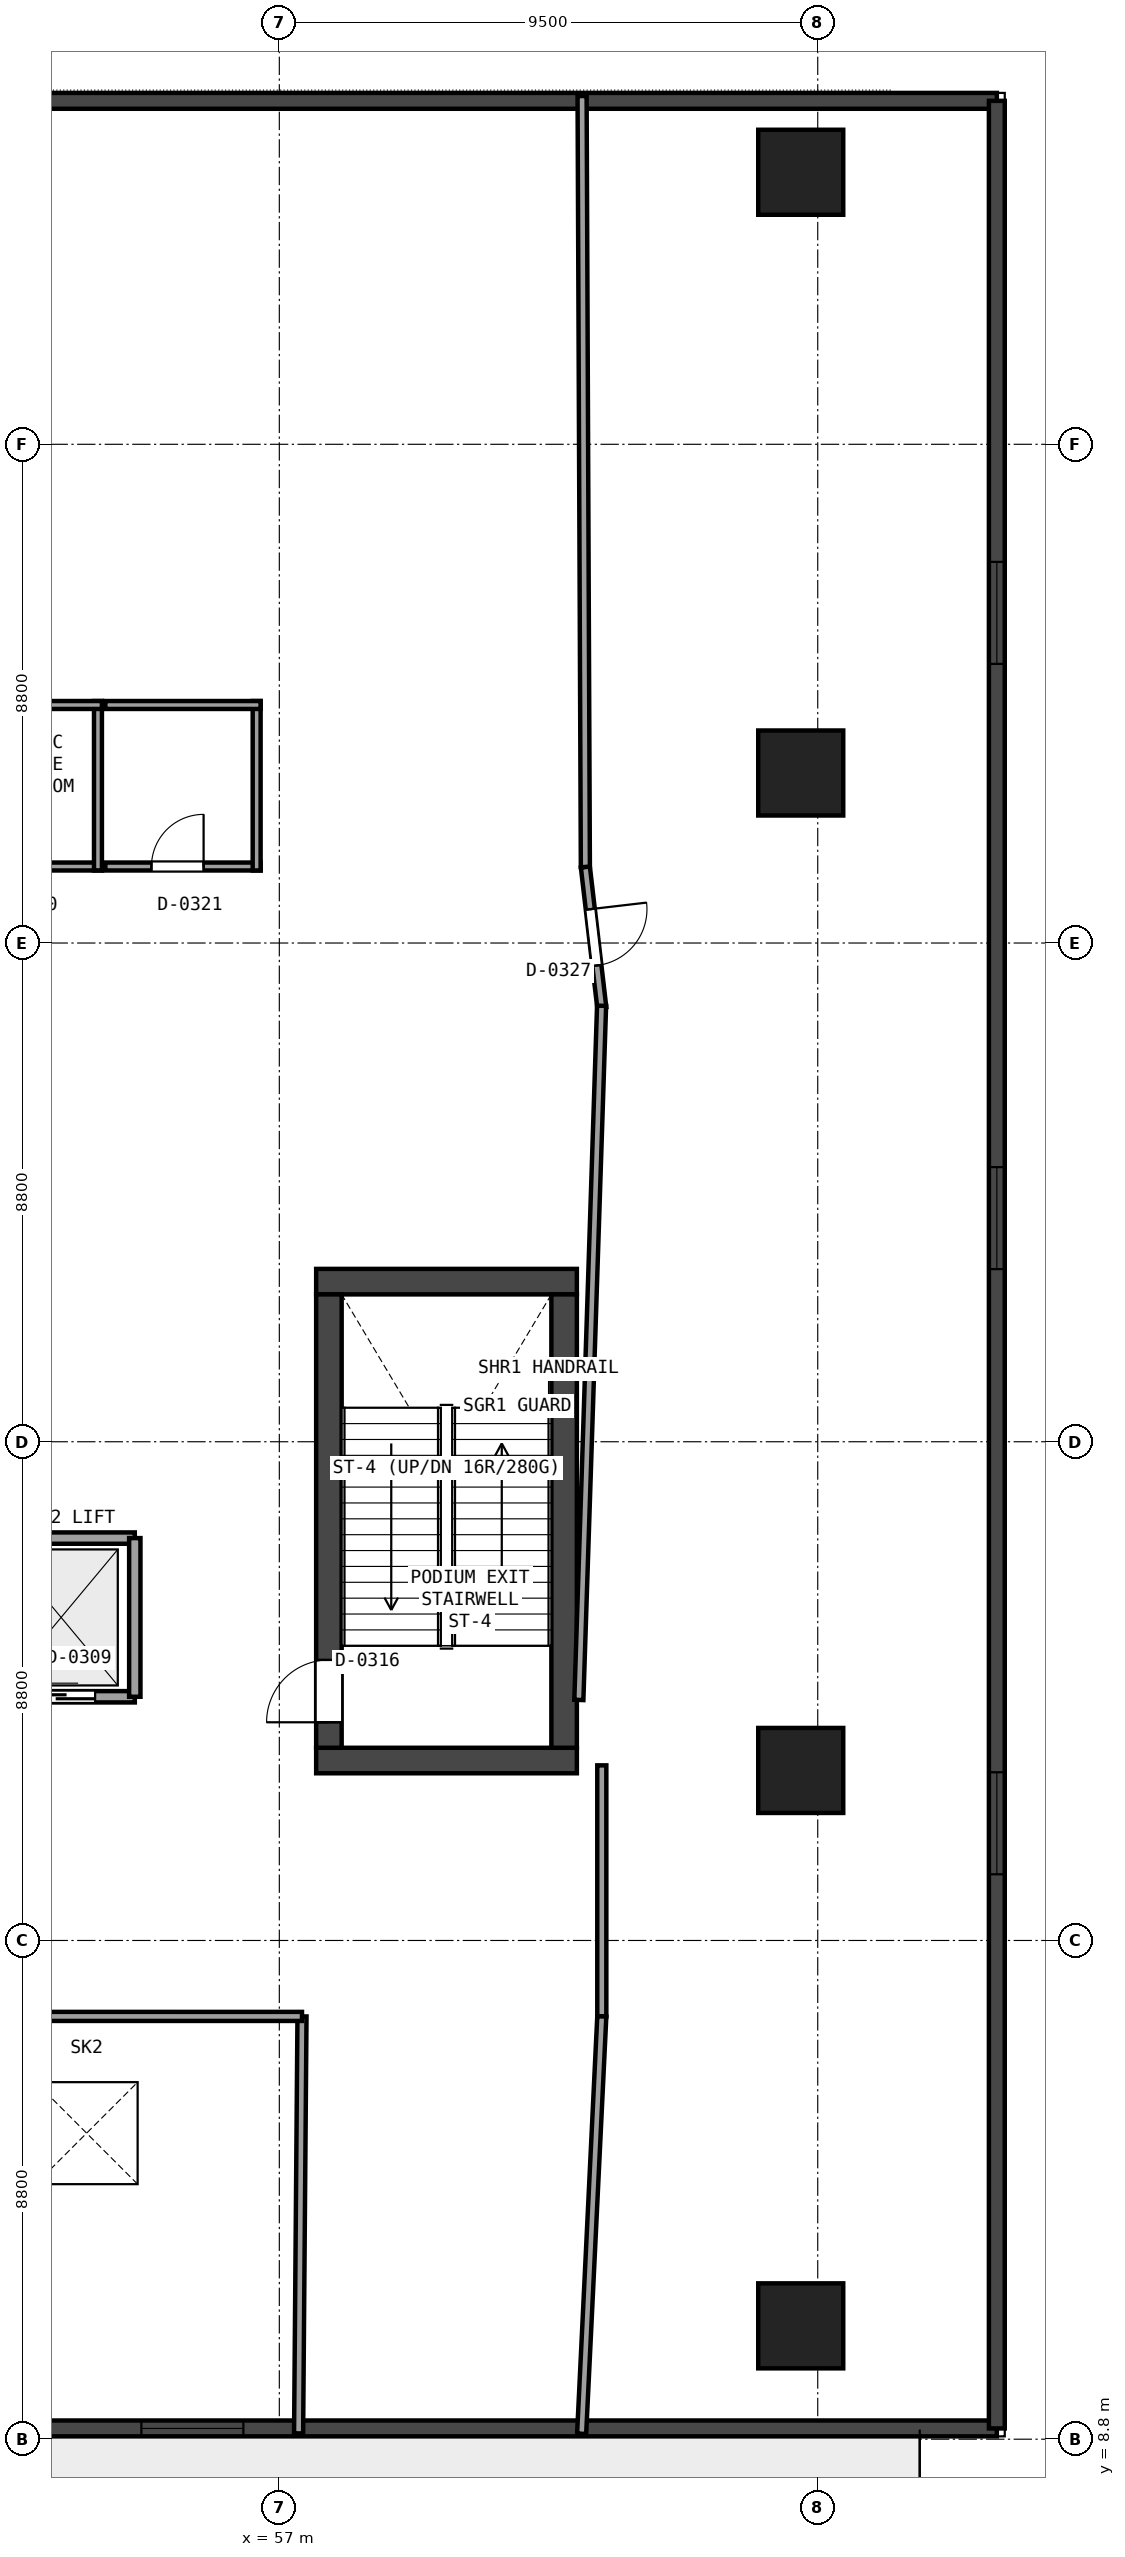
"""IFC4 building model, lengths in metres.
Left out: names, types, materials, properties, quantities, classifications, styles, units other than length and angle.
Written with IfcOpenShell. Run it as: python <this file> out.ifc"""

import sys

from ifc_helpers import new_model, si_unit, direction, frame, frame_2d, origin, origin_2d, place, context, subcontext, project, spatial, rectangle, extrude, element, fill, save


model = new_model("IFC4")
c1 = context("Model", 3, precision=1e-05, world=origin(), true_north=direction((0.0, 1.0)))
c2 = subcontext(c1, "Body", "Model", "MODEL_VIEW")
j1 = project(units=[si_unit("LENGTHUNIT", "METRE"), si_unit("PLANEANGLEUNIT", "RADIAN")], contexts=[c1])
p1 = place(None, origin())
s1 = spatial("IfcSite", under=j1, at=p1, CompositionType="ELEMENT")
p2 = place(p1, origin())
s2 = spatial("IfcBuilding", under=s1, at=p2, CompositionType="ELEMENT")
p3 = place(p2, frame((0.0, 0.0, 16.2)))
s3 = spatial("IfcBuildingStorey", under=s2, at=p3, CompositionType="ELEMENT", Elevation=16.2)
for number, where, z_axis, x_axis in (
    (1, (57.65, 20.775, 0.0), (0.0, 0.0, 1.0), (1.0, 0.0, 0.0)),
    (2, (57.65, 29.225, 0.0), (0.0, 0.0, 1.0), (1.0, 0.0, 0.0)),
):
    element("IfcWall", number, at=place(p3, frame(where, z_axis=z_axis, x_axis=x_axis)), inside=s3, PredefinedType="SHEAR", context=c2, shape_type="SweptSolid", body=[
        extrude(rectangle(XDim=4.6, YDim=0.45, at=frame_2d((2.3, 0.0))), origin(), (0.0, 0.0, 1.0), 4.98),
    ])
p4 = place(p3, frame((57.875, 21.0, 0.0), z_axis=(0.0, 0.0, 1.0), x_axis=(0.0, 1.0, 0.0)))
e3 = element("IfcWall", 3, at=p4, inside=s3, PredefinedType="SHEAR", context=c2, shape_type="SweptSolid", body=[
    extrude(rectangle(XDim=8.0, YDim=0.45, at=frame_2d((4.0, 0.0))), origin(), (0.0, 0.0, 1.0), 4.98),
])
p5 = place(p4, frame((0.45, 0.0, 0.0)))
e4 = element("IfcOpeningElement", 4, at=p5, cuts=e3, PredefinedType="OPENING", context=c2, shape_type="SweptSolid", body=[
    extrude(rectangle(XDim=1.1, YDim=2.15, at=frame_2d((0.55, 1.075))), frame((0.0, 0.235, 0.0), z_axis=(0.0, -1.0, 0.0), x_axis=(1.0, 0.0, 0.0)), (0.0, 0.0, 1.0), 0.47),
])
p6 = place(p3, frame((62.025, 21.0, 0.0), z_axis=(0.0, 0.0, 1.0), x_axis=(0.0, 1.0, 0.0)))
e5 = element("IfcWall", 5, at=p6, inside=s3, PredefinedType="SHEAR", context=c2, shape_type="SweptSolid", body=[
    extrude(rectangle(XDim=8.0, YDim=0.45, at=frame_2d((4.0, 0.0))), origin(), (0.0, 0.0, 1.0), 4.98),
])
for number, where, z_axis, x_axis in (
    (6, (66.2, 10.8, 0.0), (0.0, 0.0, 1.0), (1.0, 0.0, 0.0)),
    (7, (66.2, 20.6, 0.0), (0.0, 0.0, 1.0), (1.0, 0.0, 0.0)),
    (8, (66.2, 38.2, 0.0), (0.0, 0.0, 1.0), (1.0, 0.0, 0.0)),
    (9, (66.2, 48.8, 0.0), (0.0, 0.0, 1.0), (1.0, 0.0, 0.0)),
):
    element("IfcColumn", number, at=place(p3, frame(where, z_axis=z_axis, x_axis=x_axis)), inside=s3, PredefinedType="COLUMN", context=c2, shape_type="SweptSolid", body=[
        extrude(rectangle(XDim=1.5, YDim=1.5, at=origin_2d()), origin(), (0.0, 0.0, 1.0), 4.98),
    ])
p7 = place(p3, frame((69.66, 8.99, 0.0), z_axis=(0.0, 0.0, 1.0), x_axis=(-1.0, 0.0, 0.0)))
e10 = element("IfcWall", 10, at=p7, inside=s3, PredefinedType="SOLIDWALL", context=c2, shape_type="SweptSolid", body=[
    extrude(rectangle(XDim=64.52, YDim=0.28, at=frame_2d((32.26, 0.0))), origin(), (0.0, 0.0, 1.0), 4.98),
])
p8 = place(p7, frame((13.294, 0.0, 0.95)))
e11 = element("IfcOpeningElement", 11, at=p8, cuts=e10, PredefinedType="OPENING", context=c2, shape_type="SweptSolid", body=[
    extrude(rectangle(XDim=1.8, YDim=2.3, at=frame_2d((0.9, 1.15))), frame((0.0, 0.15, 0.0), z_axis=(0.0, -1.0, 0.0), x_axis=(1.0, 0.0, 0.0)), (0.0, 0.0, 1.0), 0.3),
])
p9 = place(p7, frame((34.06, 0.0, 0.0)))
e12 = element("IfcOpeningElement", 12, at=p9, cuts=e10, PredefinedType="OPENING", context=c2, shape_type="SweptSolid", body=[
    extrude(rectangle(XDim=1.2, YDim=2.2, at=frame_2d((0.6, 1.1))), frame((0.0, 0.15, 0.0), z_axis=(0.0, -1.0, 0.0), x_axis=(1.0, 0.0, 0.0)), (0.0, 0.0, 1.0), 0.3),
])
p10 = place(p3, frame((5.14, 50.06, 0.0), z_axis=(0.0, 0.0, 1.0), x_axis=(1.0, 0.0, 0.0)))
e13 = element("IfcWall", 13, at=p10, inside=s3, PredefinedType="SOLIDWALL", context=c2, shape_type="SweptSolid", body=[
    extrude(rectangle(XDim=64.52, YDim=0.28, at=frame_2d((32.26, 0.0))), origin(), (0.0, 0.0, 1.0), 4.98),
])
p11 = place(p10, frame((30.07, 0.0, 0.95)))
e14 = element("IfcOpeningElement", 14, at=p11, cuts=e13, PredefinedType="OPENING", context=c2, shape_type="SweptSolid", body=[
    extrude(rectangle(XDim=1.8, YDim=2.3, at=frame_2d((0.9, 1.15))), frame((0.0, 0.15, 0.0), z_axis=(0.0, -1.0, 0.0), x_axis=(1.0, 0.0, 0.0)), (0.0, 0.0, 1.0), 0.3),
])
p12 = place(p3, frame((69.66, 50.06, 0.0), z_axis=(0.0, 0.0, 1.0), x_axis=(0.0, -1.0, 0.0)))
e15 = element("IfcWall", 15, at=p12, inside=s3, PredefinedType="SOLIDWALL", context=c2, shape_type="SweptSolid", body=[
    extrude(rectangle(XDim=41.07, YDim=0.28, at=frame_2d((20.535, 0.0))), origin(), (0.0, 0.0, 1.0), 4.98),
])
p13 = place(p12, frame((8.135, 0.0, 0.95)))
e16 = element("IfcOpeningElement", 16, at=p13, cuts=e15, PredefinedType="OPENING", context=c2, shape_type="SweptSolid", body=[
    extrude(rectangle(XDim=1.8, YDim=2.3, at=frame_2d((0.9, 1.15))), frame((0.0, 0.15, 0.0), z_axis=(0.0, -1.0, 0.0), x_axis=(1.0, 0.0, 0.0)), (0.0, 0.0, 1.0), 0.3),
])
p14 = place(p12, frame((18.814, 0.0, 0.95)))
e17 = element("IfcOpeningElement", 17, at=p14, cuts=e15, PredefinedType="OPENING", context=c2, shape_type="SweptSolid", body=[
    extrude(rectangle(XDim=1.8, YDim=2.3, at=frame_2d((0.9, 1.15))), frame((0.0, 0.15, 0.0), z_axis=(0.0, -1.0, 0.0), x_axis=(1.0, 0.0, 0.0)), (0.0, 0.0, 1.0), 0.3),
])
p15 = place(p12, frame((29.492, 0.0, 0.95)))
e18 = element("IfcOpeningElement", 18, at=p15, cuts=e15, PredefinedType="OPENING", context=c2, shape_type="SweptSolid", body=[
    extrude(rectangle(XDim=1.8, YDim=2.3, at=frame_2d((0.9, 1.15))), frame((0.0, 0.15, 0.0), z_axis=(0.0, -1.0, 0.0), x_axis=(1.0, 0.0, 0.0)), (0.0, 0.0, 1.0), 0.3),
])
p16 = place(p3, frame((49.35, 24.7, 0.0), z_axis=(0.0, 0.0, 1.0), x_axis=(1.0, 0.0, 0.0)))
e19 = element("IfcWall", 19, at=p16, inside=s3, PredefinedType="SOLIDWALL", context=c2, shape_type="SweptSolid", body=[
    extrude(rectangle(XDim=5.1, YDim=0.2, at=frame_2d((2.55, 0.0))), origin(), (0.0, 0.0, 1.0), 4.98),
])
p17 = place(p3, frame((49.35, 21.9, 0.0), z_axis=(0.0, 0.0, 1.0), x_axis=(1.0, 0.0, 0.0)))
e20 = element("IfcWall", 20, at=p17, inside=s3, PredefinedType="SOLIDWALL", context=c2, shape_type="SweptSolid", body=[
    extrude(rectangle(XDim=5.1, YDim=0.2, at=frame_2d((2.55, 0.0))), origin(), (0.0, 0.0, 1.0), 4.98),
])
p18 = place(p17, frame((0.7, 0.0, 0.0)))
e21 = element("IfcOpeningElement", 21, at=p18, cuts=e20, PredefinedType="OPENING", context=c2, shape_type="SweptSolid", body=[
    extrude(rectangle(XDim=1.2, YDim=2.15, at=frame_2d((0.6, 1.075))), frame((0.0, 0.11, 0.0), z_axis=(0.0, -1.0, 0.0), x_axis=(1.0, 0.0, 0.0)), (0.0, 0.0, 1.0), 0.22),
])
p19 = place(p17, frame((3.2, 0.0, 0.0)))
e22 = element("IfcOpeningElement", 22, at=p19, cuts=e20, PredefinedType="OPENING", context=c2, shape_type="SweptSolid", body=[
    extrude(rectangle(XDim=1.2, YDim=2.15, at=frame_2d((0.6, 1.075))), frame((0.0, 0.11, 0.0), z_axis=(0.0, -1.0, 0.0), x_axis=(1.0, 0.0, 0.0)), (0.0, 0.0, 1.0), 0.22),
])
p20 = place(p3, frame((54.45, 21.9, 0.0), z_axis=(0.0, 0.0, 1.0), x_axis=(0.0, 1.0, 0.0)))
e23 = element("IfcWall", 23, at=p20, inside=s3, PredefinedType="SOLIDWALL", context=c2, shape_type="SweptSolid", body=[
    extrude(rectangle(XDim=2.8, YDim=0.2, at=frame_2d((1.4, 0.0))), origin(), (0.0, 0.0, 1.0), 4.98),
])
p21 = place(p3, frame((50.93, 36.55, 0.0), z_axis=(0.0, 0.0, 1.0), x_axis=(1.0, 0.0, 0.0)))
e24 = element("IfcWall", 24, at=p21, inside=s3, PredefinedType="PARTITIONING", context=c2, shape_type="SweptSolid", body=[
    extrude(rectangle(XDim=2.94, YDim=0.14, at=frame_2d((1.47, 0.0))), origin(), (0.0, 0.0, 1.0), 4.98),
])
p22 = place(p21, frame((0.9, 0.0, 0.0)))
e25 = element("IfcOpeningElement", 25, at=p22, cuts=e24, PredefinedType="OPENING", context=c2, shape_type="SweptSolid", body=[
    extrude(rectangle(XDim=0.92, YDim=2.1, at=frame_2d((0.46, 1.05))), frame((0.0, 0.08, 0.0), z_axis=(0.0, -1.0, 0.0), x_axis=(1.0, 0.0, 0.0)), (0.0, 0.0, 1.0), 0.16),
])
p23 = place(p3, frame((53.8, 36.48, 0.0), z_axis=(0.0, 0.0, 1.0), x_axis=(0.0, 1.0, 0.0)))
e26 = element("IfcWall", 26, at=p23, inside=s3, PredefinedType="PARTITIONING", context=c2, shape_type="SweptSolid", body=[
    extrude(rectangle(XDim=2.99, YDim=0.14, at=frame_2d((1.495, 0.0))), origin(), (0.0, 0.0, 1.0), 4.609),
])
p24 = place(p3, frame((53.87, 39.4, 0.0), z_axis=(0.0, 0.0, 1.0), x_axis=(-1.0, 0.0, 0.0)))
e27 = element("IfcWall", 27, at=p24, inside=s3, PredefinedType="PARTITIONING", context=c2, shape_type="SweptSolid", body=[
    extrude(rectangle(XDim=2.94, YDim=0.14, at=frame_2d((1.47, 0.0))), origin(), (0.0, 0.0, 1.0), 4.609),
])
p25 = place(p3, frame((53.93, 36.55, 0.0), z_axis=(0.0, 0.0, 1.0), x_axis=(1.0, 0.0, 0.0)))
e28 = element("IfcWall", 28, at=p25, inside=s3, PredefinedType="PARTITIONING", context=c2, shape_type="SweptSolid", body=[
    extrude(rectangle(XDim=2.74, YDim=0.14, at=frame_2d((1.37, 0.0))), origin(), (0.0, 0.0, 1.0), 4.98),
])
p26 = place(p25, frame((0.814, 0.0, 0.0)))
e29 = element("IfcOpeningElement", 29, at=p26, cuts=e28, PredefinedType="OPENING", context=c2, shape_type="SweptSolid", body=[
    extrude(rectangle(XDim=0.92, YDim=2.1, at=frame_2d((0.46, 1.05))), frame((0.0, 0.08, 0.0), z_axis=(0.0, -1.0, 0.0), x_axis=(1.0, 0.0, 0.0)), (0.0, 0.0, 1.0), 0.16),
])
p27 = place(p3, frame((56.6, 36.48, 0.0), z_axis=(0.0, 0.0, 1.0), x_axis=(0.0, 1.0, 0.0)))
e30 = element("IfcWall", 30, at=p27, inside=s3, PredefinedType="PARTITIONING", context=c2, shape_type="SweptSolid", body=[
    extrude(rectangle(XDim=2.99, YDim=0.14, at=frame_2d((1.495, 0.0))), origin(), (0.0, 0.0, 1.0), 4.609),
])
p28 = place(p3, frame((56.67, 39.4, 0.0), z_axis=(0.0, 0.0, 1.0), x_axis=(-1.0, 0.0, 0.0)))
e31 = element("IfcWall", 31, at=p28, inside=s3, PredefinedType="PARTITIONING", context=c2, shape_type="SweptSolid", body=[
    extrude(rectangle(XDim=2.74, YDim=0.14, at=frame_2d((1.37, 0.0))), origin(), (0.0, 0.0, 1.0), 4.609),
])
p29 = place(p3, frame((57.34, 8.902, 0.0), z_axis=(0.0, 0.0, 1.0), x_axis=(0.008129003417, 0.999966959106, 0.0)))
e32 = element("IfcWall", 32, at=p29, inside=s3, PredefinedType="PARTITIONING", context=c2, shape_type="SweptSolid", body=[
    extrude(rectangle(XDim=7.358, YDim=0.16, at=frame_2d((3.679, 0.0))), origin(), (0.0, 0.0, 1.0), 4.121),
])
p30 = place(p3, frame((57.4, 16.26, 0.0), z_axis=(0.0, 0.0, 1.0), x_axis=(-0.99999999956, 2.9668308e-05, 0.0)))
e33 = element("IfcWall", 33, at=p30, inside=s3, PredefinedType="PARTITIONING", context=c2, shape_type="SweptSolid", body=[
    extrude(rectangle(XDim=32.916, YDim=0.16, at=frame_2d((16.458, 0.0))), origin(), (0.0, 0.0, 1.0), 4.133),
])
p31 = place(p30, frame((15.958, 0.0, 0.0)))
e34 = element("IfcOpeningElement", 34, at=p31, cuts=e33, PredefinedType="OPENING", context=c2, shape_type="SweptSolid", body=[
    extrude(rectangle(XDim=1.0, YDim=2.15, at=frame_2d((0.5, 1.075))), frame((0.0, 0.09, 0.0), z_axis=(0.0, -1.0, 0.0), x_axis=(1.0, 0.0, 0.0)), (0.0, 0.0, 1.0), 0.18),
])
p32 = place(p3, frame((62.342, 50.145, 0.0), z_axis=(0.0, 0.0, 1.0), x_axis=(0.004252913481, -0.999990956323, 0.0)))
e35 = element("IfcWall", 35, at=p32, inside=s3, PredefinedType="PARTITIONING", context=c2, shape_type="SweptSolid", body=[
    extrude(rectangle(XDim=13.605, YDim=0.16, at=frame_2d((6.803, 0.0))), origin(), (0.0, 0.0, 1.0), 4.065),
])
p33 = place(p3, frame((62.4, 36.54, 0.0), z_axis=(0.0, 0.0, 1.0), x_axis=(0.116160443909, -0.993230462315, 0.0)))
e36 = element("IfcWall", 36, at=p33, inside=s3, PredefinedType="PARTITIONING", context=c2, shape_type="SweptSolid", body=[
    extrude(rectangle(XDim=2.497, YDim=0.16, at=frame_2d((1.249, 0.0))), origin(), (0.0, 0.0, 1.0), 4.609),
])
p34 = place(p33, frame((0.748, 0.0, 0.0)))
e37 = element("IfcOpeningElement", 37, at=p34, cuts=e36, PredefinedType="OPENING", context=c2, shape_type="SweptSolid", body=[
    extrude(rectangle(XDim=1.0, YDim=2.15, at=frame_2d((0.5, 1.075))), frame((0.0, 0.09, 0.0), z_axis=(0.0, -1.0, 0.0), x_axis=(1.0, 0.0, 0.0)), (0.0, 0.0, 1.0), 0.18),
])
p35 = place(p3, frame((62.686, 34.093, 0.0), z_axis=(0.0, 0.0, 1.0), x_axis=(-0.032729804283, -0.999464236435, 0.0)))
e38 = element("IfcWall", 38, at=p35, inside=s3, PredefinedType="PARTITIONING", context=c2, shape_type="SweptSolid", body=[
    extrude(rectangle(XDim=12.256, YDim=0.16, at=frame_2d((6.128, 0.0))), origin(), (0.0, 0.0, 1.0), 4.98),
])
p36 = place(p3, frame((62.69, 20.69, 0.0), z_axis=(0.0, 0.0, 1.0), x_axis=(0.0, -1.0, 0.0)))
e39 = element("IfcWall", 39, at=p36, inside=s3, PredefinedType="PARTITIONING", context=c2, shape_type="SweptSolid", body=[
    extrude(rectangle(XDim=4.43, YDim=0.16, at=frame_2d((2.215, 0.0))), origin(), (0.0, 0.0, 1.0), 4.065),
])
p37 = place(p3, frame((62.69, 16.26, 0.0), z_axis=(0.0, 0.0, 1.0), x_axis=(-0.048280995583, -0.998833792713, 0.0)))
e40 = element("IfcWall", 40, at=p37, inside=s3, PredefinedType="PARTITIONING", context=c2, shape_type="SweptSolid", body=[
    extrude(rectangle(XDim=7.373, YDim=0.16, at=frame_2d((3.686, 0.0))), origin(), (0.0, 0.0, 1.0), 4.121),
])
p38 = place(p13, origin())
e41 = element("IfcWindow", 41, at=p38, inside=s3, PartitioningType="SINGLE_PANEL", PredefinedType="WINDOW", context=c2, shape_type="SweptSolid", body=[
    extrude(rectangle(XDim=1.8, YDim=2.3, at=frame_2d((0.9, 1.15))), frame((0.0, 0.03, 0.0), z_axis=(0.0, -1.0, 0.0), x_axis=(1.0, 0.0, 0.0)), (0.0, 0.0, 1.0), 0.06),
])
fill(e16, e41)
p39 = place(p14, origin())
e42 = element("IfcWindow", 42, at=p39, inside=s3, PartitioningType="SINGLE_PANEL", PredefinedType="WINDOW", context=c2, shape_type="SweptSolid", body=[
    extrude(rectangle(XDim=1.8, YDim=2.3, at=frame_2d((0.9, 1.15))), frame((0.0, 0.03, 0.0), z_axis=(0.0, -1.0, 0.0), x_axis=(1.0, 0.0, 0.0)), (0.0, 0.0, 1.0), 0.06),
])
fill(e17, e42)
p40 = place(p15, origin())
e43 = element("IfcWindow", 43, at=p40, inside=s3, PartitioningType="SINGLE_PANEL", PredefinedType="WINDOW", context=c2, shape_type="SweptSolid", body=[
    extrude(rectangle(XDim=1.8, YDim=2.3, at=frame_2d((0.9, 1.15))), frame((0.0, 0.03, 0.0), z_axis=(0.0, -1.0, 0.0), x_axis=(1.0, 0.0, 0.0)), (0.0, 0.0, 1.0), 0.06),
])
fill(e18, e43)
p41 = place(p8, origin())
e44 = element("IfcWindow", 44, at=p41, inside=s3, PartitioningType="SINGLE_PANEL", PredefinedType="WINDOW", context=c2, shape_type="SweptSolid", body=[
    extrude(rectangle(XDim=1.8, YDim=2.3, at=frame_2d((0.9, 1.15))), frame((0.0, 0.03, 0.0), z_axis=(0.0, -1.0, 0.0), x_axis=(1.0, 0.0, 0.0)), (0.0, 0.0, 1.0), 0.06),
])
fill(e11, e44)
p42 = place(p3, frame((0.0, 0.0, -0.35)))
p43 = place(p42, frame((53.6, 14.2, 0.0)))
p44 = place(p43, frame((0.0, 0.0, 0.3)))
e45 = element("IfcWindow", 45, at=p44, inside=s3, PartitioningType="SINGLE_PANEL", PredefinedType="SKYLIGHT", context=c2, shape_type="SweptSolid", body=[
    extrude(rectangle(XDim=1.8, YDim=1.8, at=origin_2d()), origin(), (0.0, 0.0, 1.0), 0.05),
])
p45 = place(p5, origin())
e46 = element("IfcDoor", 46, at=p45, inside=s3, OperationType="SINGLE_SWING_LEFT", PredefinedType="DOOR", context=c2, shape_type="SweptSolid", body=[
    extrude(rectangle(XDim=1.1, YDim=2.15, at=frame_2d((0.55, 1.075))), frame((0.0, 0.025, 0.0), z_axis=(0.0, -1.0, 0.0), x_axis=(1.0, 0.0, 0.0)), (0.0, 0.0, 1.0), 0.05),
])
fill(e4, e46)
p46 = place(p19, origin())
e47 = element("IfcDoor", 47, at=p46, inside=s3, OperationType="SLIDING_TO_LEFT", PredefinedType="DOOR", context=c2, shape_type="SweptSolid", body=[
    extrude(rectangle(XDim=1.2, YDim=2.15, at=frame_2d((0.6, 1.075))), frame((0.0, 0.025, 0.0), z_axis=(0.0, -1.0, 0.0), x_axis=(1.0, 0.0, 0.0)), (0.0, 0.0, 1.0), 0.05),
])
fill(e22, e47)
p47 = place(p26, origin())
e48 = element("IfcDoor", 48, at=p47, inside=s3, OperationType="SINGLE_SWING_RIGHT", PredefinedType="DOOR", context=c2, shape_type="SweptSolid", body=[
    extrude(rectangle(XDim=0.92, YDim=2.1, at=frame_2d((0.46, 1.05))), frame((0.0, 0.025, 0.0), z_axis=(0.0, -1.0, 0.0), x_axis=(1.0, 0.0, 0.0)), (0.0, 0.0, 1.0), 0.05),
])
fill(e29, e48)
p48 = place(p34, origin())
e49 = element("IfcDoor", 49, at=p48, inside=s3, OperationType="SINGLE_SWING_LEFT", PredefinedType="DOOR", context=c2, shape_type="SweptSolid", body=[
    extrude(rectangle(XDim=1.0, YDim=2.15, at=frame_2d((0.5, 1.075))), frame((0.0, 0.025, 0.0), z_axis=(0.0, -1.0, 0.0), x_axis=(1.0, 0.0, 0.0)), (0.0, 0.0, 1.0), 0.05),
])
fill(e37, e49)
save(model, sys.argv[1])
